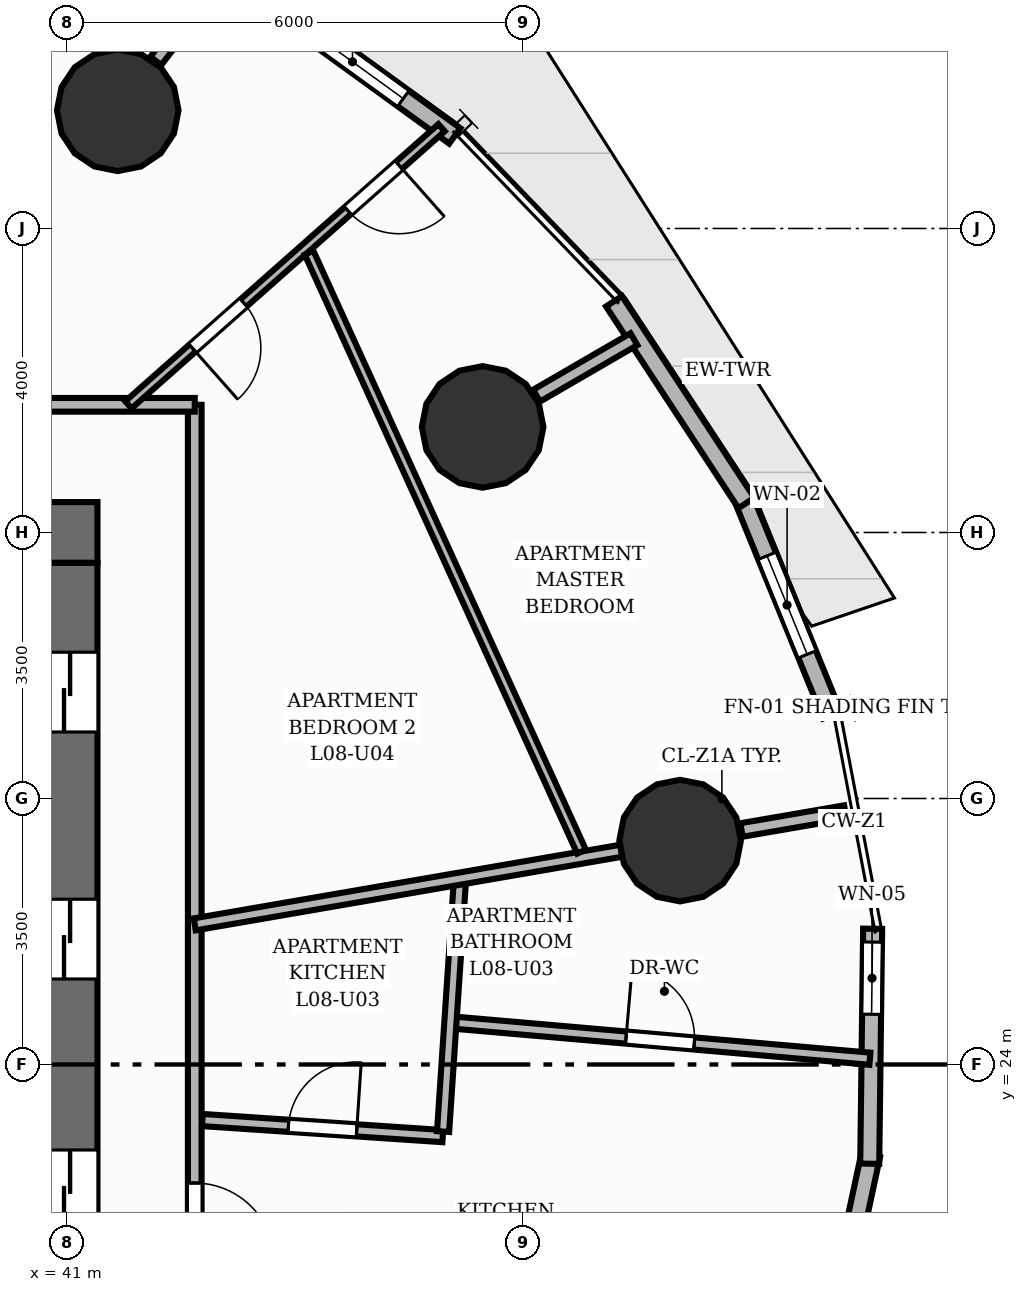
"""IFC4 building model, lengths in metres.
Left out: names, types, materials, properties, quantities, classifications, styles, units other than length and angle.
Written with IfcOpenShell. Run it as: python <this file> out.ifc"""

import sys

from ifc_helpers import new_model, si_unit, direction, frame, frame_2d, origin, origin_2d, place, context, subcontext, project, spatial, rectangle, circle, extrude, element, fill, save


model = new_model("IFC4")
c1 = context("Model", 3, precision=1e-05, world=origin(), true_north=direction((0.0, 1.0)))
c2 = subcontext(c1, "Body", "Model", "MODEL_VIEW")
j1 = project(units=[si_unit("LENGTHUNIT", "METRE"), si_unit("PLANEANGLEUNIT", "RADIAN")], contexts=[c1])
p1 = place(None, origin())
s1 = spatial("IfcSite", under=j1, at=p1, CompositionType="ELEMENT")
p2 = place(p1, origin())
s2 = spatial("IfcBuilding", under=s1, at=p2, CompositionType="ELEMENT")
p3 = place(p2, frame((0.0, 0.0, 31.2)))
s3 = spatial("IfcBuildingStorey", under=s2, at=p3, CompositionType="ELEMENT", Elevation=31.2)
p4 = place(p3, frame((22.6, 31.0, 0.0), z_axis=(0.0, 0.0, 1.0), x_axis=(1.0, 0.0, 0.0)))
e1 = element("IfcWall", 1, at=p4, inside=s3, PredefinedType="SHEAR", context=c2, shape_type="SweptSolid", body=[
    extrude(rectangle(XDim=18.8, YDim=0.8, at=frame_2d((9.4, 0.0))), origin(), (0.0, 0.0, 1.0), 3.2),
])
p5 = place(p4, frame((11.8, 0.0, 0.0)))
e2 = element("IfcOpeningElement", 2, at=p5, cuts=e1, PredefinedType="OPENING", context=c2, shape_type="SweptSolid", body=[
    extrude(rectangle(XDim=1.1, YDim=2.15, at=frame_2d((0.55, 1.075))), frame((0.0, 0.41, 0.0), z_axis=(0.0, -1.0, 0.0), x_axis=(1.0, 0.0, 0.0)), (0.0, 0.0, 1.0), 0.82),
])
p6 = place(p3, frame((41.0, 17.4, 0.0), z_axis=(0.0, 0.0, 1.0), x_axis=(0.0, 1.0, 0.0)))
e3 = element("IfcWall", 3, at=p6, inside=s3, PredefinedType="SHEAR", context=c2, shape_type="SweptSolid", body=[
    extrude(rectangle(XDim=13.2, YDim=0.8, at=frame_2d((6.6, 0.0))), origin(), (0.0, 0.0, 1.0), 3.2),
])
p7 = place(p6, frame((1.175, 0.0, 0.0)))
e4 = element("IfcOpeningElement", 4, at=p7, cuts=e3, PredefinedType="OPENING", context=c2, shape_type="SweptSolid", body=[
    extrude(rectangle(XDim=1.05, YDim=2.15, at=frame_2d((0.525, 1.075))), frame((0.0, 0.41, 0.0), z_axis=(0.0, -1.0, 0.0), x_axis=(1.0, 0.0, 0.0)), (0.0, 0.0, 1.0), 0.82),
])
p8 = place(p6, frame((4.425, 0.0, 0.0)))
e5 = element("IfcOpeningElement", 5, at=p8, cuts=e3, PredefinedType="OPENING", context=c2, shape_type="SweptSolid", body=[
    extrude(rectangle(XDim=1.05, YDim=2.15, at=frame_2d((0.525, 1.075))), frame((0.0, 0.41, 0.0), z_axis=(0.0, -1.0, 0.0), x_axis=(1.0, 0.0, 0.0)), (0.0, 0.0, 1.0), 0.82),
])
p9 = place(p6, frame((7.725, 0.0, 0.0)))
e6 = element("IfcOpeningElement", 6, at=p9, cuts=e3, PredefinedType="OPENING", context=c2, shape_type="SweptSolid", body=[
    extrude(rectangle(XDim=1.05, YDim=2.15, at=frame_2d((0.525, 1.075))), frame((0.0, 0.41, 0.0), z_axis=(0.0, -1.0, 0.0), x_axis=(1.0, 0.0, 0.0)), (0.0, 0.0, 1.0), 0.82),
])
p10 = place(p6, frame((10.975, 0.0, 0.0)))
e7 = element("IfcOpeningElement", 7, at=p10, cuts=e3, PredefinedType="OPENING", context=c2, shape_type="SweptSolid", body=[
    extrude(rectangle(XDim=1.05, YDim=2.15, at=frame_2d((0.525, 1.075))), frame((0.0, 0.41, 0.0), z_axis=(0.0, -1.0, 0.0), x_axis=(1.0, 0.0, 0.0)), (0.0, 0.0, 1.0), 0.82),
])
for number, where, z_axis, x_axis in (
    (8, (49.066, 26.946, 0.0), (0.0, 0.0, 1.0), (1.0, 0.0, 0.0)),
    (9, (46.468, 32.389, 0.0), (0.0, 0.0, 1.0), (1.0, 0.0, 0.0)),
    (10, (41.667, 36.555, 0.0), (0.0, 0.0, 1.0), (1.0, 0.0, 0.0)),
):
    element("IfcColumn", number, at=place(p3, frame(where, z_axis=z_axis, x_axis=x_axis)), inside=s3, PredefinedType="COLUMN", context=c2, shape_type="SweptSolid", body=[
        extrude(circle(Radius=0.8, at=origin_2d()), origin(), (0.0, 0.0, 1.0), 3.2),
    ])
p11 = place(p3, frame((49.885, 31.489, 0.0), z_axis=(0.0, 0.0, 1.0), x_axis=(0.377493207518, -0.926012353199, 0.0)))
e11 = element("IfcWall", 11, at=p11, inside=s3, PredefinedType="SOLIDWALL", context=c2, shape_type="SweptSolid", body=[
    extrude(rectangle(XDim=3.121, YDim=0.25, at=frame_2d((1.56, 0.0))), origin(), (0.0, 0.0, 1.0), 2.96),
])
p12 = place(p11, frame((0.86, 0.0, 0.85)))
e12 = element("IfcOpeningElement", 12, at=p12, cuts=e11, PredefinedType="OPENING", context=c2, shape_type="SweptSolid", body=[
    extrude(rectangle(XDim=1.4, YDim=1.55, at=frame_2d((0.7, 0.775))), frame((0.0, 0.135, 0.0), z_axis=(0.0, -1.0, 0.0), x_axis=(1.0, 0.0, 0.0)), (0.0, 0.0, 1.0), 0.27),
])
p13 = place(p3, frame((48.196, 34.042, 0.0), z_axis=(0.0, 0.0, 1.0), x_axis=(0.548579153619, -0.836098625889, 0.0)))
e13 = element("IfcWall", 13, at=p13, inside=s3, PredefinedType="SOLIDWALL", context=c2, shape_type="SweptSolid", body=[
    extrude(rectangle(XDim=3.174, YDim=0.25, at=frame_2d((1.587, 0.0))), origin(), (0.0, 0.0, 1.0), 2.96),
])
p14 = place(p3, frame((43.411, 38.168, 0.0), z_axis=(0.0, 0.0, 1.0), x_axis=(0.809637503316, -0.58693024562, 0.0)))
e14 = element("IfcWall", 14, at=p14, inside=s3, PredefinedType="SOLIDWALL", context=c2, shape_type="SweptSolid", body=[
    extrude(rectangle(XDim=3.323, YDim=0.25, at=frame_2d((1.661, 0.0))), origin(), (0.0, 0.0, 1.0), 2.96),
])
p15 = place(p14, frame((0.836, 0.0, 0.85)))
e15 = element("IfcOpeningElement", 15, at=p15, cuts=e14, PredefinedType="OPENING", context=c2, shape_type="SweptSolid", body=[
    extrude(rectangle(XDim=1.65, YDim=1.55, at=frame_2d((0.825, 0.775))), frame((0.0, 0.135, 0.0), z_axis=(0.0, -1.0, 0.0), x_axis=(1.0, 0.0, 0.0)), (0.0, 0.0, 1.0), 0.27),
])
p16 = place(p3, frame((51.573, 22.808, 0.0), z_axis=(0.0, 0.0, 1.0), x_axis=(-0.209668000253, -0.977772637002, 0.0)))
e16 = element("IfcWall", 16, at=p16, inside=s3, PredefinedType="SOLIDWALL", context=c2, shape_type="SweptSolid", body=[
    extrude(rectangle(XDim=3.121, YDim=0.25, at=frame_2d((1.56, 0.0))), origin(), (0.0, 0.0, 1.0), 2.96),
])
p17 = place(p3, frame((51.599, 25.786, 0.0), z_axis=(0.0, 0.0, 1.0), x_axis=(-0.012397373015, -0.999923149618, 0.0)))
e17 = element("IfcWall", 17, at=p17, inside=s3, PredefinedType="SOLIDWALL", context=c2, shape_type="SweptSolid", body=[
    extrude(rectangle(XDim=3.092, YDim=0.25, at=frame_2d((1.546, 0.0))), origin(), (0.0, 0.0, 1.0), 2.96),
])
p18 = place(p17, frame((0.175, 0.0, 0.85)))
e18 = element("IfcOpeningElement", 18, at=p18, cuts=e17, PredefinedType="OPENING", context=c2, shape_type="SweptSolid", body=[
    extrude(rectangle(XDim=0.95, YDim=1.45, at=frame_2d((0.475, 0.725))), frame((0.0, 0.135, 0.0), z_axis=(0.0, -1.0, 0.0), x_axis=(1.0, 0.0, 0.0)), (0.0, 0.0, 1.0), 0.27),
])
p19 = place(p3, frame((49.874, 27.085, 0.0), z_axis=(0.0, 0.0, 1.0), x_axis=(0.985429571056, 0.170083980696, 0.0)))
e19 = element("IfcWall", 19, at=p19, inside=s3, PredefinedType="PARTITIONING", context=c2, shape_type="SweptSolid", body=[
    extrude(rectangle(XDim=1.385, YDim=0.18, at=frame_2d((0.693, 0.0))), origin(), (0.0, 0.0, 1.0), 2.178),
])
p20 = place(p3, frame((47.177, 32.8, 0.0), z_axis=(0.0, 0.0, 1.0), x_axis=(0.865049792178, 0.501686014408, 0.0)))
e20 = element("IfcWall", 20, at=p20, inside=s3, PredefinedType="PARTITIONING", context=c2, shape_type="SweptSolid", body=[
    extrude(rectangle(XDim=1.481, YDim=0.18, at=frame_2d((0.74, 0.0))), origin(), (0.0, 0.0, 1.0), 2.178),
])
p21 = place(p3, frame((42.167, 37.205, 0.0), z_axis=(0.0, 0.0, 1.0), x_axis=(0.609967804345, 0.792426196982, 0.0)))
e21 = element("IfcWall", 21, at=p21, inside=s3, PredefinedType="PARTITIONING", context=c2, shape_type="SweptSolid", body=[
    extrude(rectangle(XDim=1.377, YDim=0.18, at=frame_2d((0.688, 0.0))), origin(), (0.0, 0.0, 1.0), 2.178),
])
p22 = place(p3, frame((42.68, 32.68, 0.0), z_axis=(0.0, 0.0, 1.0), x_axis=(0.0, -1.0, 0.0)))
e22 = element("IfcWall", 22, at=p22, inside=s3, PredefinedType="PARTITIONING", context=c2, shape_type="SweptSolid", body=[
    extrude(rectangle(XDim=17.36, YDim=0.18, at=frame_2d((8.68, 0.0))), origin(), (0.0, 0.0, 1.0), 2.955),
])
p23 = place(p22, frame((10.24, 0.0, 0.0)))
e23 = element("IfcOpeningElement", 23, at=p23, cuts=e22, PredefinedType="OPENING", context=c2, shape_type="SweptSolid", body=[
    extrude(rectangle(XDim=1.05, YDim=2.15, at=frame_2d((0.525, 1.075))), frame((0.0, 0.1, 0.0), z_axis=(0.0, -1.0, 0.0), x_axis=(1.0, 0.0, 0.0)), (0.0, 0.0, 1.0), 0.2),
])
p24 = place(p3, frame((30.102, 32.68, 0.0), z_axis=(0.0, 0.0, 1.0), x_axis=(1.0, 0.0, 0.0)))
e24 = element("IfcWall", 24, at=p24, inside=s3, PredefinedType="PARTITIONING", context=c2, shape_type="SweptSolid", body=[
    extrude(rectangle(XDim=12.578, YDim=0.18, at=frame_2d((6.289, 0.0))), origin(), (0.0, 0.0, 1.0), 2.955),
])
p25 = place(p24, frame((8.233, 0.0, 0.0)))
e25 = element("IfcOpeningElement", 25, at=p25, cuts=e24, PredefinedType="OPENING", context=c2, shape_type="SweptSolid", body=[
    extrude(rectangle(XDim=1.05, YDim=2.15, at=frame_2d((0.525, 1.075))), frame((0.0, 0.1, 0.0), z_axis=(0.0, -1.0, 0.0), x_axis=(1.0, 0.0, 0.0)), (0.0, 0.0, 1.0), 0.2),
])
p26 = place(p3, frame((46.044, 24.555, 0.0), z_axis=(0.0, 0.0, 1.0), x_axis=(0.996262385211, -0.086378584226, 0.0)))
e26 = element("IfcWall", 26, at=p26, inside=s3, PredefinedType="PLUMBINGWALL", context=c2, shape_type="SweptSolid", body=[
    extrude(rectangle(XDim=5.54, YDim=0.16, at=frame_2d((2.77, 0.0))), origin(), (0.0, 0.0, 1.0), 2.641),
])
p27 = place(p26, frame((2.32, 0.0, 0.0)))
e27 = element("IfcOpeningElement", 27, at=p27, cuts=e26, PredefinedType="OPENING", context=c2, shape_type="SweptSolid", body=[
    extrude(rectangle(XDim=0.9, YDim=2.1, at=frame_2d((0.45, 1.05))), frame((0.0, 0.09, 0.0), z_axis=(0.0, -1.0, 0.0), x_axis=(1.0, 0.0, 0.0)), (0.0, 0.0, 1.0), 0.18),
])
p28 = place(p3, frame((42.78, 23.269, 0.0), z_axis=(0.0, 0.0, 1.0), x_axis=(0.99776911562, -0.066759208461, 0.0)))
e28 = element("IfcWall", 28, at=p28, inside=s3, PredefinedType="PLUMBINGWALL", context=c2, shape_type="SweptSolid", body=[
    extrude(rectangle(XDim=3.171, YDim=0.16, at=frame_2d((1.585, 0.0))), origin(), (0.0, 0.0, 1.0), 2.641),
])
p29 = place(p28, frame((1.135, 0.0, 0.0)))
e29 = element("IfcOpeningElement", 29, at=p29, cuts=e28, PredefinedType="OPENING", context=c2, shape_type="SweptSolid", body=[
    extrude(rectangle(XDim=0.9, YDim=2.1, at=frame_2d((0.45, 1.05))), frame((0.0, 0.09, 0.0), z_axis=(0.0, -1.0, 0.0), x_axis=(1.0, 0.0, 0.0)), (0.0, 0.0, 1.0), 0.18),
])
p30 = place(p3, frame((45.947, 23.117, 0.0), z_axis=(0.0, 0.0, 1.0), x_axis=(0.066888153037, 0.997760479766, 0.0)))
e30 = element("IfcWall", 30, at=p30, inside=s3, PredefinedType="PLUMBINGWALL", context=c2, shape_type="SweptSolid", body=[
    extrude(rectangle(XDim=3.336, YDim=0.16, at=frame_2d((1.668, 0.0))), origin(), (0.0, 0.0, 1.0), 2.955),
])
p31 = place(p3, frame((42.68, 25.844, 0.0), z_axis=(0.0, 0.0, 1.0), x_axis=(0.985435597438, 0.170049061456, 0.0)))
e31 = element("IfcWall", 31, at=p31, inside=s3, PredefinedType="PLUMBINGWALL", context=c2, shape_type="SweptSolid", body=[
    extrude(rectangle(XDim=5.694, YDim=0.16, at=frame_2d((2.847, 0.0))), origin(), (0.0, 0.0, 1.0), 2.178),
])
p32 = place(p3, frame((45.927, 36.326, 0.0), z_axis=(0.0, 0.0, 1.0), x_axis=(-0.748844909992, -0.662745275939, 0.0)))
e32 = element("IfcWall", 32, at=p32, inside=s3, PredefinedType="PARTITIONING", context=c2, shape_type="SweptSolid", body=[
    extrude(rectangle(XDim=5.501, YDim=0.125, at=frame_2d((2.75, 0.0))), origin(), (0.0, 0.0, 1.0), 2.955),
])
p33 = place(p32, frame((0.746, 0.0, 0.0)))
e33 = element("IfcOpeningElement", 33, at=p33, cuts=e32, PredefinedType="OPENING", context=c2, shape_type="SweptSolid", body=[
    extrude(rectangle(XDim=0.9, YDim=2.1, at=frame_2d((0.45, 1.05))), frame((0.0, 0.073, 0.0), z_axis=(0.0, -1.0, 0.0), x_axis=(1.0, 0.0, 0.0)), (0.0, 0.0, 1.0), 0.145),
])
p34 = place(p32, frame((3.476, 0.0, 0.0)))
e34 = element("IfcOpeningElement", 34, at=p34, cuts=e32, PredefinedType="OPENING", context=c2, shape_type="SweptSolid", body=[
    extrude(rectangle(XDim=0.9, YDim=2.1, at=frame_2d((0.45, 1.05))), frame((0.0, 0.073, 0.0), z_axis=(0.0, -1.0, 0.0), x_axis=(1.0, 0.0, 0.0)), (0.0, 0.0, 1.0), 0.145),
])
p35 = place(p3, frame((47.769, 26.801, 0.0), z_axis=(0.0, 0.0, 1.0), x_axis=(-0.414076998559, 0.910241857565, 0.0)))
e35 = element("IfcWall", 35, at=p35, inside=s3, PredefinedType="PARTITIONING", context=c2, shape_type="SweptSolid", body=[
    extrude(rectangle(XDim=8.658, YDim=0.125, at=frame_2d((4.329, 0.0))), origin(), (0.0, 0.0, 1.0), 2.328),
])
p36 = place(p12, origin())
e36 = element("IfcWindow", 36, at=p36, inside=s3, PartitioningType="SINGLE_PANEL", PredefinedType="WINDOW", context=c2, shape_type="SweptSolid", body=[
    extrude(rectangle(XDim=1.4, YDim=1.55, at=frame_2d((0.7, 0.775))), frame((0.0, 0.03, 0.0), z_axis=(0.0, -1.0, 0.0), x_axis=(1.0, 0.0, 0.0)), (0.0, 0.0, 1.0), 0.06),
])
fill(e12, e36)
p37 = place(p15, origin())
e37 = element("IfcWindow", 37, at=p37, inside=s3, PartitioningType="SINGLE_PANEL", PredefinedType="WINDOW", context=c2, shape_type="SweptSolid", body=[
    extrude(rectangle(XDim=1.65, YDim=1.55, at=frame_2d((0.825, 0.775))), frame((0.0, 0.03, 0.0), z_axis=(0.0, -1.0, 0.0), x_axis=(1.0, 0.0, 0.0)), (0.0, 0.0, 1.0), 0.06),
])
fill(e15, e37)
p38 = place(p18, origin())
e38 = element("IfcWindow", 38, at=p38, inside=s3, PartitioningType="SINGLE_PANEL", PredefinedType="WINDOW", context=c2, shape_type="SweptSolid", body=[
    extrude(rectangle(XDim=0.95, YDim=1.45, at=frame_2d((0.475, 0.725))), frame((0.0, 0.03, 0.0), z_axis=(0.0, -1.0, 0.0), x_axis=(1.0, 0.0, 0.0)), (0.0, 0.0, 1.0), 0.06),
])
fill(e18, e38)
p39 = place(p8, origin())
e39 = element("IfcDoor", 39, at=p39, inside=s3, OperationType="DOUBLE_DOOR_SLIDING", PredefinedType="DOOR", context=c2, shape_type="SweptSolid", body=[
    extrude(rectangle(XDim=1.05, YDim=2.15, at=frame_2d((0.525, 1.075))), frame((0.0, 0.025, 0.0), z_axis=(0.0, -1.0, 0.0), x_axis=(1.0, 0.0, 0.0)), (0.0, 0.0, 1.0), 0.05),
])
fill(e5, e39)
p40 = place(p9, origin())
e40 = element("IfcDoor", 40, at=p40, inside=s3, OperationType="DOUBLE_DOOR_SLIDING", PredefinedType="DOOR", context=c2, shape_type="SweptSolid", body=[
    extrude(rectangle(XDim=1.05, YDim=2.15, at=frame_2d((0.525, 1.075))), frame((0.0, 0.025, 0.0), z_axis=(0.0, -1.0, 0.0), x_axis=(1.0, 0.0, 0.0)), (0.0, 0.0, 1.0), 0.05),
])
fill(e6, e40)
p41 = place(p10, origin())
e41 = element("IfcDoor", 41, at=p41, inside=s3, OperationType="DOUBLE_DOOR_SLIDING", PredefinedType="DOOR", context=c2, shape_type="SweptSolid", body=[
    extrude(rectangle(XDim=1.05, YDim=2.15, at=frame_2d((0.525, 1.075))), frame((0.0, 0.025, 0.0), z_axis=(0.0, -1.0, 0.0), x_axis=(1.0, 0.0, 0.0)), (0.0, 0.0, 1.0), 0.05),
])
fill(e7, e41)
p42 = place(p23, origin())
e42 = element("IfcDoor", 42, at=p42, inside=s3, OperationType="SINGLE_SWING_RIGHT", PredefinedType="DOOR", context=c2, shape_type="SweptSolid", body=[
    extrude(rectangle(XDim=1.05, YDim=2.15, at=frame_2d((0.525, 1.075))), frame((0.0, 0.025, 0.0), z_axis=(0.0, -1.0, 0.0), x_axis=(1.0, 0.0, 0.0)), (0.0, 0.0, 1.0), 0.05),
])
fill(e23, e42)
p43 = place(p27, origin())
e43 = element("IfcDoor", 43, at=p43, inside=s3, OperationType="SINGLE_SWING_LEFT", PredefinedType="DOOR", context=c2, shape_type="SweptSolid", body=[
    extrude(rectangle(XDim=0.9, YDim=2.1, at=frame_2d((0.45, 1.05))), frame((0.0, 0.025, 0.0), z_axis=(0.0, -1.0, 0.0), x_axis=(1.0, 0.0, 0.0)), (0.0, 0.0, 1.0), 0.05),
])
fill(e27, e43)
p44 = place(p29, origin())
e44 = element("IfcDoor", 44, at=p44, inside=s3, OperationType="SINGLE_SWING_RIGHT", PredefinedType="DOOR", context=c2, shape_type="SweptSolid", body=[
    extrude(rectangle(XDim=0.9, YDim=2.1, at=frame_2d((0.45, 1.05))), frame((0.0, 0.025, 0.0), z_axis=(0.0, -1.0, 0.0), x_axis=(1.0, 0.0, 0.0)), (0.0, 0.0, 1.0), 0.05),
])
fill(e29, e44)
p45 = place(p33, origin())
e45 = element("IfcDoor", 45, at=p45, inside=s3, OperationType="SINGLE_SWING_LEFT", PredefinedType="DOOR", context=c2, shape_type="SweptSolid", body=[
    extrude(rectangle(XDim=0.9, YDim=2.1, at=frame_2d((0.45, 1.05))), frame((0.0, 0.025, 0.0), z_axis=(0.0, -1.0, 0.0), x_axis=(1.0, 0.0, 0.0)), (0.0, 0.0, 1.0), 0.05),
])
fill(e33, e45)
p46 = place(p34, origin())
e46 = element("IfcDoor", 46, at=p46, inside=s3, OperationType="SINGLE_SWING_RIGHT", PredefinedType="DOOR", context=c2, shape_type="SweptSolid", body=[
    extrude(rectangle(XDim=0.9, YDim=2.1, at=frame_2d((0.45, 1.05))), frame((0.0, 0.025, 0.0), z_axis=(0.0, -1.0, 0.0), x_axis=(1.0, 0.0, 0.0)), (0.0, 0.0, 1.0), 0.05),
])
fill(e34, e46)
save(model, sys.argv[1])
